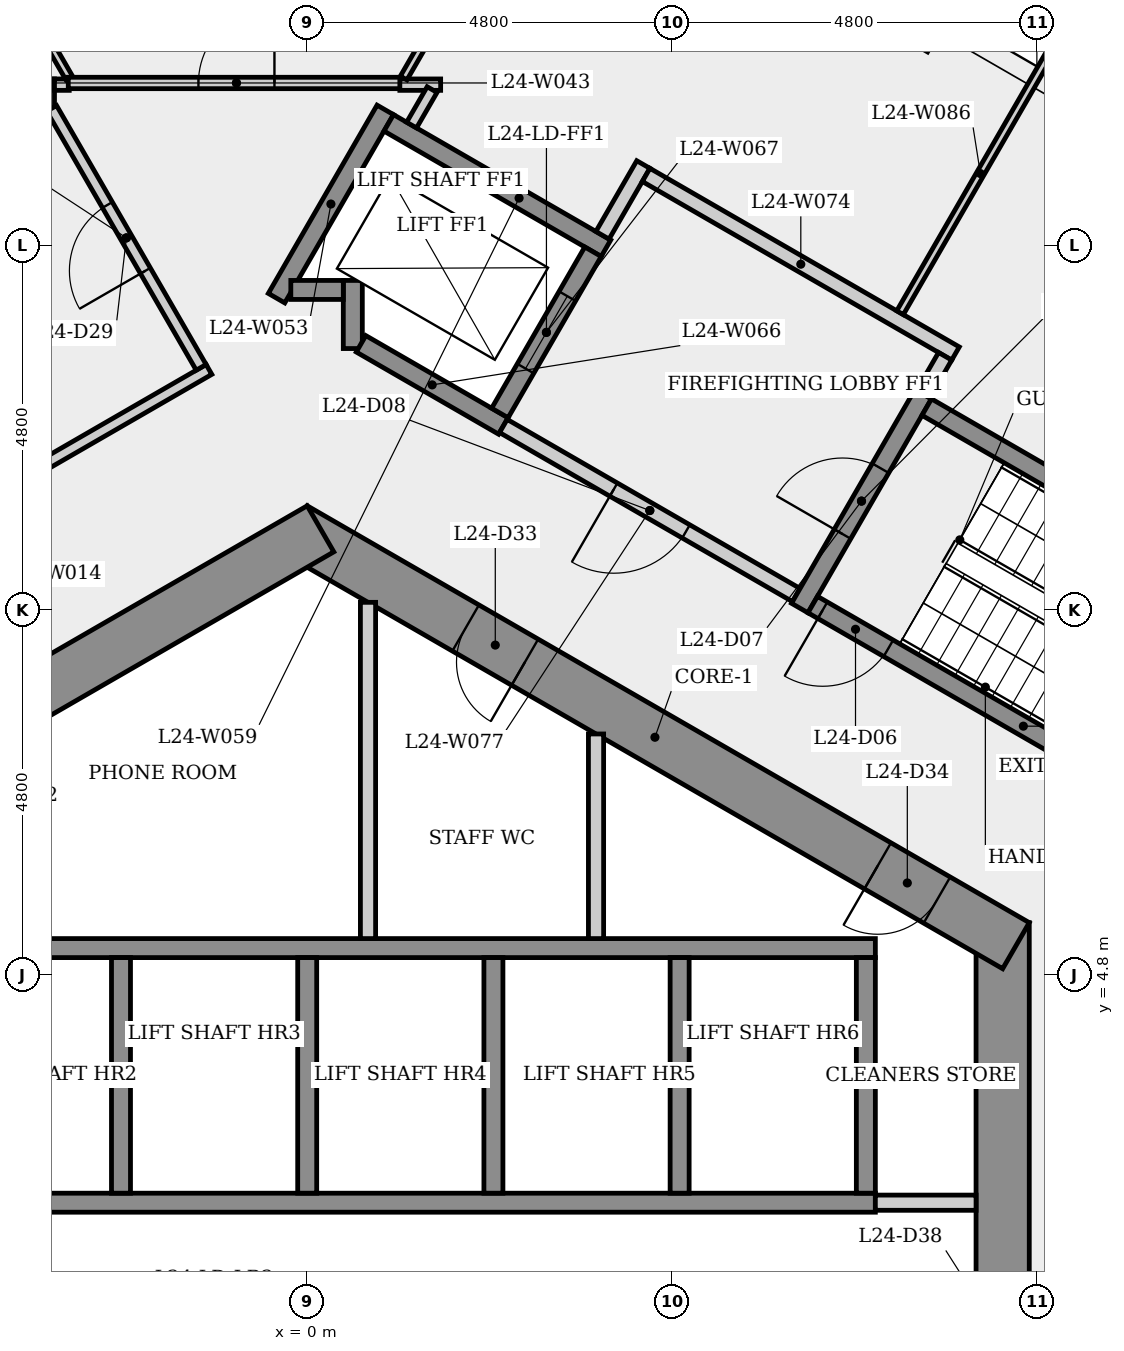
"""IFC4 building model, lengths in metres.
Left out: names, types, materials, properties, quantities, classifications, styles, units other than length and angle.
Written with IfcOpenShell. Run it as: python <this file> out.ifc"""

import sys

from ifc_helpers import new_model, si_unit, direction, frame, frame_2d, origin, place, context, subcontext, project, spatial, rectangle, extrude, element, fill, save


model = new_model("IFC4")
c1 = context("Model", 3, precision=1e-05, world=origin(), true_north=direction((0.0, 1.0)))
c2 = subcontext(c1, "Body", "Model", "MODEL_VIEW")
j1 = project(units=[si_unit("LENGTHUNIT", "METRE"), si_unit("PLANEANGLEUNIT", "RADIAN")], contexts=[c1])
p1 = place(None, origin())
s1 = spatial("IfcSite", under=j1, at=p1, CompositionType="ELEMENT")
p2 = place(p1, origin())
s2 = spatial("IfcBuilding", under=s1, at=p2, CompositionType="ELEMENT")
p3 = place(p2, frame((0.0, 0.0, 93.3)))
s3 = spatial("IfcBuildingStorey", under=s2, at=p3, CompositionType="ELEMENT", Elevation=93.3)
p4 = place(p3, frame((9.15, -5.485, 0.0), z_axis=(0.0, 0.0, 1.0), x_axis=(0.0, 1.0, 0.0)))
e1 = element("IfcWall", 1, at=p4, inside=s3, PredefinedType="SHEAR", context=c2, shape_type="SweptSolid", body=[
    extrude(rectangle(XDim=10.97, YDim=0.7, at=frame_2d((5.485, 0.0))), origin(), (0.0, 0.0, 1.0), 3.4),
])
p5 = place(p4, frame((4.685, 0.0, 0.0)))
e2 = element("IfcOpeningElement", 2, at=p5, cuts=e1, PredefinedType="OPENING", context=c2, shape_type="SweptSolid", body=[
    extrude(rectangle(XDim=1.6, YDim=2.1, at=frame_2d((0.8, 1.05))), frame((0.0, 0.36, 0.0), z_axis=(0.0, -1.0, 0.0), x_axis=(1.0, 0.0, 0.0)), (0.0, 0.0, 1.0), 0.72),
])
p6 = place(p3, frame((9.325, 5.182, 0.0), z_axis=(0.0, 0.0, 1.0), x_axis=(-0.866023993627, 0.500002442456, 0.0)))
e3 = element("IfcWall", 3, at=p6, inside=s3, PredefinedType="SHEAR", context=c2, shape_type="SweptSolid", body=[
    extrude(rectangle(XDim=10.97, YDim=0.7, at=frame_2d((5.485, 0.0))), origin(), (0.0, 0.0, 1.0), 3.4),
])
p7 = place(p6, frame((7.46, 0.0, 0.0)))
e4 = element("IfcOpeningElement", 4, at=p7, cuts=e3, PredefinedType="OPENING", context=c2, shape_type="SweptSolid", body=[
    extrude(rectangle(XDim=0.9, YDim=2.1, at=frame_2d((0.45, 1.05))), frame((0.0, 0.36, 0.0), z_axis=(0.0, -1.0, 0.0), x_axis=(1.0, 0.0, 0.0)), (0.0, 0.0, 1.0), 0.72),
])
p8 = place(p6, frame((1.201, 0.0, 0.0)))
e5 = element("IfcOpeningElement", 5, at=p8, cuts=e3, PredefinedType="OPENING", context=c2, shape_type="SweptSolid", body=[
    extrude(rectangle(XDim=0.9, YDim=2.1, at=frame_2d((0.45, 1.05))), frame((0.0, 0.36, 0.0), z_axis=(0.0, -1.0, 0.0), x_axis=(1.0, 0.0, 0.0)), (0.0, 0.0, 1.0), 0.72),
])
p9 = place(p3, frame((0.175, 10.667, 0.0), z_axis=(0.0, 0.0, 1.0), x_axis=(-0.866023993627, -0.500002442456, 0.0)))
e6 = element("IfcWall", 6, at=p9, inside=s3, PredefinedType="SHEAR", context=c2, shape_type="SweptSolid", body=[
    extrude(rectangle(XDim=10.97, YDim=0.7, at=frame_2d((5.485, 0.0))), origin(), (0.0, 0.0, 1.0), 3.4),
])
p10 = place(p9, frame((6.214, 0.0, 0.0)))
e7 = element("IfcOpeningElement", 7, at=p10, cuts=e6, PredefinedType="OPENING", context=c2, shape_type="SweptSolid", body=[
    extrude(rectangle(XDim=0.9, YDim=2.1, at=frame_2d((0.45, 1.05))), frame((0.0, 0.36, 0.0), z_axis=(0.0, -1.0, 0.0), x_axis=(1.0, 0.0, 0.0)), (0.0, 0.0, 1.0), 0.72),
])
p11 = place(p3, frame((-10.624, 7.376, 0.0), z_axis=(0.0, 0.0, 1.0), x_axis=(0.86602446816, 0.500001620546, 0.0)))
e8 = element("IfcWall", 8, at=p11, inside=s3, PredefinedType="PARTITIONING", context=c2, shape_type="SweptSolid", body=[
    extrude(rectangle(XDim=10.775, YDim=0.15, at=frame_2d((5.387, 0.0))), origin(), (0.0, 0.0, 1.0), 3.05),
])
p12 = place(p11, frame((5.31, 0.0, 0.0)))
e9 = element("IfcOpeningElement", 9, at=p12, cuts=e8, PredefinedType="OPENING", context=c2, shape_type="SweptSolid", body=[
    extrude(rectangle(XDim=1.0, YDim=2.1, at=frame_2d((0.5, 1.05))), frame((0.0, 0.085, 0.0), z_axis=(0.0, -1.0, 0.0), x_axis=(1.0, 0.0, 0.0)), (0.0, 0.0, 1.0), 0.17),
])
p13 = place(p3, frame((-7.475, 1.8, 0.0), z_axis=(0.0, 0.0, 1.0), x_axis=(1.0, 0.0, 0.0)))
e10 = element("IfcWall", 10, at=p13, inside=s3, PredefinedType="SHEAR", context=c2, shape_type="SweptSolid", body=[
    extrude(rectangle(XDim=14.95, YDim=0.25, at=frame_2d((7.475, 0.0))), origin(), (0.0, 0.0, 1.0), 3.05),
])
p14 = place(p3, frame((-7.225, 5.15, 0.0), z_axis=(0.0, 0.0, 1.0), x_axis=(1.0, 0.0, 0.0)))
e11 = element("IfcWall", 11, at=p14, inside=s3, PredefinedType="SHEAR", context=c2, shape_type="SweptSolid", body=[
    extrude(rectangle(XDim=14.7, YDim=0.25, at=frame_2d((7.35, 0.0))), origin(), (0.0, 0.0, 1.0), 3.05),
])
p15 = place(p3, frame((-3.4, 16.189, 0.0), z_axis=(0.0, 0.0, 1.0), x_axis=(0.0, 1.0, 0.0)))
e12 = element("IfcWall", 12, at=p15, inside=s3, PredefinedType="PARTITIONING", context=c2, shape_type="SweptSolid", body=[
    extrude(rectangle(XDim=0.397, YDim=0.15, at=frame_2d((0.199, 0.0))), origin(), (0.0, 0.0, 1.0), 3.05),
])
p16 = place(p3, frame((-3.325, 16.511, 0.0), z_axis=(0.0, 0.0, 1.0), x_axis=(1.0, 0.0, 0.0)))
e13 = element("IfcWall", 13, at=p16, inside=s3, PredefinedType="PARTITIONING", context=c2, shape_type="SweptSolid", body=[
    extrude(rectangle(XDim=0.194, YDim=0.15, at=frame_2d((0.097, 0.0))), origin(), (0.0, 0.0, 1.0), 3.05),
])
p17 = place(p3, frame((-3.131, 16.598, 0.0), z_axis=(0.0, 0.0, 1.0), x_axis=(-0.499982733475, 0.866035372388, 0.0)))
e14 = element("IfcWall", 14, at=p17, inside=s3, PredefinedType="PARTITIONING", context=c2, shape_type="SweptSolid", body=[
    extrude(rectangle(XDim=3.546, YDim=0.1, at=frame_2d((1.773, 0.0))), origin(), (0.0, 0.0, 1.0), 3.05),
])
p18 = place(p3, frame((-3.144, 16.533, 0.0), z_axis=(0.0, 0.0, 1.0), x_axis=(1.0, 0.0, 0.0)))
e15 = element("IfcWall", 15, at=p18, inside=s3, PredefinedType="PARTITIONING", context=c2, shape_type="SweptSolid", body=[
    extrude(rectangle(XDim=4.425, YDim=0.15, at=frame_2d((2.212, 0.0))), origin(), (0.0, 0.0, 1.0), 3.05),
])
p19 = place(p18, frame((1.713, 0.0, 0.0)))
e16 = element("IfcOpeningElement", 16, at=p19, cuts=e15, PredefinedType="OPENING", context=c2, shape_type="SweptSolid", body=[
    extrude(rectangle(XDim=1.0, YDim=2.1, at=frame_2d((0.5, 1.05))), frame((0.0, 0.085, 0.0), z_axis=(0.0, -1.0, 0.0), x_axis=(1.0, 0.0, 0.0)), (0.0, 0.0, 1.0), 0.17),
])
p20 = place(p3, frame((-2.45, 5.025, 0.0), z_axis=(0.0, 0.0, 1.0), x_axis=(0.0, -1.0, 0.0)))
e17 = element("IfcWall", 17, at=p20, inside=s3, PredefinedType="SHEAR", context=c2, shape_type="SweptSolid", body=[
    extrude(rectangle(XDim=3.1, YDim=0.25, at=frame_2d((1.55, 0.0))), origin(), (0.0, 0.0, 1.0), 3.4),
])
p21 = place(p3, frame((-1.395, 12.791, 0.0), z_axis=(0.0, 0.0, 1.0), x_axis=(-0.500016051241, 0.866016136398, 0.0)))
e18 = element("IfcWall", 18, at=p21, inside=s3, PredefinedType="PARTITIONING", context=c2, shape_type="SweptSolid", body=[
    extrude(rectangle(XDim=3.935, YDim=0.15, at=frame_2d((1.967, 0.0))), origin(), (0.0, 0.0, 1.0), 3.05),
])
p22 = place(p21, frame((1.467, 0.0, 0.0)))
e19 = element("IfcOpeningElement", 19, at=p22, cuts=e18, PredefinedType="OPENING", context=c2, shape_type="SweptSolid", body=[
    extrude(rectangle(XDim=1.0, YDim=2.1, at=frame_2d((0.5, 1.05))), frame((0.0, 0.085, 0.0), z_axis=(0.0, -1.0, 0.0), x_axis=(1.0, 0.0, 0.0)), (0.0, 0.0, 1.0), 0.17),
])
p23 = place(p3, frame((-0.403, 13.702, 0.0), z_axis=(0.0, 0.0, 1.0), x_axis=(0.499976111731, 0.866039195244, 0.0)))
e20 = element("IfcWall", 20, at=p23, inside=s3, PredefinedType="SHEAR", context=c2, shape_type="SweptSolid", body=[
    extrude(rectangle(XDim=2.861, YDim=0.25, at=frame_2d((1.43, 0.0))), origin(), (0.0, 0.0, 1.0), 3.05),
])
p24 = place(p3, frame((0.0, 5.025, 0.0), z_axis=(0.0, 0.0, 1.0), x_axis=(0.0, -1.0, 0.0)))
e21 = element("IfcWall", 21, at=p24, inside=s3, PredefinedType="SHEAR", context=c2, shape_type="SweptSolid", body=[
    extrude(rectangle(XDim=3.1, YDim=0.25, at=frame_2d((1.55, 0.0))), origin(), (0.0, 0.0, 1.0), 3.4),
])
p25 = place(p3, frame((0.6, 13.039, 0.0), z_axis=(0.0, 0.0, 1.0), x_axis=(0.0, 1.0, 0.0)))
e22 = element("IfcWall", 22, at=p25, inside=s3, PredefinedType="SHEAR", context=c2, shape_type="SweptSolid", body=[
    extrude(rectangle(XDim=0.896, YDim=0.25, at=frame_2d((0.448, 0.0))), origin(), (0.0, 0.0, 1.0), 3.05),
])
p26 = place(p3, frame((0.475, 13.81, 0.0), z_axis=(0.0, 0.0, 1.0), x_axis=(-1.0, 0.0, 0.0)))
e23 = element("IfcWall", 23, at=p26, inside=s3, PredefinedType="SHEAR", context=c2, shape_type="SweptSolid", body=[
    extrude(rectangle(XDim=0.691, YDim=0.25, at=frame_2d((0.345, 0.0))), origin(), (0.0, 0.0, 1.0), 3.4),
])
p27 = place(p3, frame((0.8, 9.699, 0.0), z_axis=(0.0, 0.0, 1.0), x_axis=(0.0, -1.0, 0.0)))
e24 = element("IfcWall", 24, at=p27, inside=s3, PredefinedType="PARTITIONING", context=c2, shape_type="SweptSolid", body=[
    extrude(rectangle(XDim=4.425, YDim=0.2, at=frame_2d((2.212, 0.0))), origin(), (0.0, 0.0, 1.0), 3.05),
])
p28 = place(p3, frame((1.073, 16.008, 0.0), z_axis=(0.0, 0.0, 1.0), x_axis=(0.866040211805, -0.499974350878, 0.0)))
e25 = element("IfcWall", 25, at=p28, inside=s3, PredefinedType="SHEAR", context=c2, shape_type="SweptSolid", body=[
    extrude(rectangle(XDim=3.3, YDim=0.25, at=frame_2d((1.65, 0.0))), origin(), (0.0, 0.0, 1.0), 3.05),
])
p29 = place(p3, frame((1.219, 16.511, 0.0), z_axis=(0.0, 0.0, 1.0), x_axis=(1.0, 0.0, 0.0)))
e26 = element("IfcWall", 26, at=p29, inside=s3, PredefinedType="PARTITIONING", context=c2, shape_type="SweptSolid", body=[
    extrude(rectangle(XDim=0.537, YDim=0.15, at=frame_2d((0.269, 0.0))), origin(), (0.0, 0.0, 1.0), 3.05),
])
p30 = place(p3, frame((1.643, 16.446, 0.0), z_axis=(0.0, 0.0, 1.0), x_axis=(-0.500179556555, -0.865921711937, 0.0)))
e27 = element("IfcWall", 27, at=p30, inside=s3, PredefinedType="PARTITIONING", context=c2, shape_type="SweptSolid", body=[
    extrude(rectangle(XDim=0.539, YDim=0.15, at=frame_2d((0.27, 0.0))), origin(), (0.0, 0.0, 1.0), 3.05),
])
p31 = place(p3, frame((2.45, 5.025, 0.0), z_axis=(0.0, 0.0, 1.0), x_axis=(0.0, -1.0, 0.0)))
e28 = element("IfcWall", 28, at=p31, inside=s3, PredefinedType="SHEAR", context=c2, shape_type="SweptSolid", body=[
    extrude(rectangle(XDim=3.1, YDim=0.25, at=frame_2d((1.55, 0.0))), origin(), (0.0, 0.0, 1.0), 3.4),
])
p32 = place(p3, frame((2.581, 12.02, 0.0), z_axis=(0.0, 0.0, 1.0), x_axis=(-0.86603892542, 0.499976579108, 0.0)))
e29 = element("IfcWall", 29, at=p32, inside=s3, PredefinedType="SHEAR", context=c2, shape_type="SweptSolid", body=[
    extrude(rectangle(XDim=2.162, YDim=0.25, at=frame_2d((1.081, 0.0))), origin(), (0.0, 0.0, 1.0), 3.05),
])
p33 = place(p3, frame((2.535, 12.191, 0.0), z_axis=(0.0, 0.0, 1.0), x_axis=(0.500061746146, 0.865989751695, 0.0)))
e30 = element("IfcWall", 30, at=p33, inside=s3, PredefinedType="SHEAR", context=c2, shape_type="SweptSolid", body=[
    extrude(rectangle(XDim=2.45, YDim=0.25, at=frame_2d((1.225, 0.0))), origin(), (0.0, 0.0, 1.0), 3.4),
])
p34 = place(p33, frame((0.675, 0.0, 0.0)))
e31 = element("IfcOpeningElement", 31, at=p34, cuts=e30, PredefinedType="OPENING", context=c2, shape_type="SweptSolid", body=[
    extrude(rectangle(XDim=1.1, YDim=2.1, at=frame_2d((0.55, 1.05))), frame((0.0, 0.135, 0.0), z_axis=(0.0, -1.0, 0.0), x_axis=(1.0, 0.0, 0.0)), (0.0, 0.0, 1.0), 0.27),
])
p35 = place(p3, frame((3.679, 20.772, 0.0), z_axis=(0.0, 0.0, 1.0), x_axis=(-0.500023547092, -0.866011808438, 0.0)))
e32 = element("IfcWall", 32, at=p35, inside=s3, PredefinedType="PARTITIONING", context=c2, shape_type="SweptSolid", body=[
    extrude(rectangle(XDim=4.82, YDim=0.1, at=frame_2d((2.41, 0.0))), origin(), (0.0, 0.0, 1.0), 3.05),
])
p36 = place(p35, frame((2.22, 0.0, 0.0)))
e33 = element("IfcOpeningElement", 33, at=p36, cuts=e32, PredefinedType="OPENING", context=c2, shape_type="SweptSolid", body=[
    extrude(rectangle(XDim=0.9, YDim=2.1, at=frame_2d((0.45, 1.05))), frame((0.0, 0.06, 0.0), z_axis=(0.0, -1.0, 0.0), x_axis=(1.0, 0.0, 0.0)), (0.0, 0.0, 1.0), 0.12),
])
p37 = place(p3, frame((3.8, 7.967, 0.0), z_axis=(0.0, 0.0, 1.0), x_axis=(0.0, -1.0, 0.0)))
e34 = element("IfcWall", 34, at=p37, inside=s3, PredefinedType="PARTITIONING", context=c2, shape_type="SweptSolid", body=[
    extrude(rectangle(XDim=2.692, YDim=0.2, at=frame_2d((1.346, 0.0))), origin(), (0.0, 0.0, 1.0), 3.05),
])
p38 = place(p3, frame((3.885, 14.529, 0.0), z_axis=(0.0, 0.0, 1.0), x_axis=(0.499997628298, 0.866026773083, 0.0)))
e35 = element("IfcWall", 35, at=p38, inside=s3, PredefinedType="PARTITIONING", context=c2, shape_type="SweptSolid", body=[
    extrude(rectangle(XDim=1.075, YDim=0.2, at=frame_2d((0.538, 0.0))), origin(), (0.0, 0.0, 1.0), 3.05),
])
p39 = place(p3, frame((4.459, 15.323, 0.0), z_axis=(0.0, 0.0, 1.0), x_axis=(0.866016039709, -0.500016218704, 0.0)))
e36 = element("IfcWall", 36, at=p39, inside=s3, PredefinedType="PARTITIONING", context=c2, shape_type="SweptSolid", body=[
    extrude(rectangle(XDim=4.7, YDim=0.2, at=frame_2d((2.35, 0.0))), origin(), (0.0, 0.0, 1.0), 3.05),
])
p40 = place(p3, frame((4.9, 5.025, 0.0), z_axis=(0.0, 0.0, 1.0), x_axis=(0.0, -1.0, 0.0)))
e37 = element("IfcWall", 37, at=p40, inside=s3, PredefinedType="SHEAR", context=c2, shape_type="SweptSolid", body=[
    extrude(rectangle(XDim=3.1, YDim=0.25, at=frame_2d((1.55, 0.0))), origin(), (0.0, 0.0, 1.0), 3.4),
])
p41 = place(p3, frame((6.435, 9.795, 0.0), z_axis=(0.0, 0.0, 1.0), x_axis=(-0.866012907634, 0.500021643343, 0.0)))
e38 = element("IfcWall", 38, at=p41, inside=s3, PredefinedType="PARTITIONING", context=c2, shape_type="SweptSolid", body=[
    extrude(rectangle(XDim=4.45, YDim=0.2, at=frame_2d((2.225, 0.0))), origin(), (0.0, 0.0, 1.0), 3.05),
])
p42 = place(p41, frame((1.675, 0.0, 0.0)))
e39 = element("IfcOpeningElement", 39, at=p42, cuts=e38, PredefinedType="OPENING", context=c2, shape_type="SweptSolid", body=[
    extrude(rectangle(XDim=1.1, YDim=2.1, at=frame_2d((0.55, 1.05))), frame((0.0, 0.11, 0.0), z_axis=(0.0, -1.0, 0.0), x_axis=(1.0, 0.0, 0.0)), (0.0, 0.0, 1.0), 0.22),
])
p43 = place(p3, frame((6.48, 9.624, 0.0), z_axis=(0.0, 0.0, 1.0), x_axis=(0.500017246033, 0.866015446554, 0.0)))
e40 = element("IfcWall", 40, at=p43, inside=s3, PredefinedType="SHEAR", context=c2, shape_type="SweptSolid", body=[
    extrude(rectangle(XDim=3.25, YDim=0.25, at=frame_2d((1.625, 0.0))), origin(), (0.0, 0.0, 1.0), 3.05),
])
p44 = place(p43, frame((1.125, 0.0, 0.0)))
e41 = element("IfcOpeningElement", 41, at=p44, cuts=e40, PredefinedType="OPENING", context=c2, shape_type="SweptSolid", body=[
    extrude(rectangle(XDim=1.0, YDim=2.1, at=frame_2d((0.5, 1.05))), frame((0.0, 0.135, 0.0), z_axis=(0.0, -1.0, 0.0), x_axis=(1.0, 0.0, 0.0)), (0.0, 0.0, 1.0), 0.27),
])
p45 = place(p3, frame((7.475, 1.8, 0.0), z_axis=(0.0, 0.0, 1.0), x_axis=(1.0, 0.0, 0.0)))
e42 = element("IfcWall", 42, at=p45, inside=s3, PredefinedType="PARTITIONING", context=c2, shape_type="SweptSolid", body=[
    extrude(rectangle(XDim=1.325, YDim=0.2, at=frame_2d((0.663, 0.0))), origin(), (0.0, 0.0, 1.0), 3.05),
])
p46 = place(p3, frame((7.35, 5.025, 0.0), z_axis=(0.0, 0.0, 1.0), x_axis=(0.0, -1.0, 0.0)))
e43 = element("IfcWall", 43, at=p46, inside=s3, PredefinedType="SHEAR", context=c2, shape_type="SweptSolid", body=[
    extrude(rectangle(XDim=3.1, YDim=0.25, at=frame_2d((1.55, 0.0))), origin(), (0.0, 0.0, 1.0), 3.4),
])
p47 = place(p3, frame((7.8, 13.51, 0.0), z_axis=(0.0, 0.0, 1.0), x_axis=(0.499988999718, 0.866031754707, 0.0)))
e44 = element("IfcWall", 44, at=p47, inside=s3, PredefinedType="PARTITIONING", context=c2, shape_type="SweptSolid", body=[
    extrude(rectangle(XDim=4.229, YDim=0.1, at=frame_2d((2.114, 0.0))), origin(), (0.0, 0.0, 1.0), 3.05),
])
p48 = place(p3, frame((8.151, 12.268, 0.0), z_axis=(0.0, 0.0, 1.0), x_axis=(0.866025499775, -0.499999833739, 0.0)))
e45 = element("IfcWall", 45, at=p48, inside=s3, PredefinedType="SHEAR", context=c2, shape_type="SweptSolid", body=[
    extrude(rectangle(XDim=6.4, YDim=0.25, at=frame_2d((3.2, 0.0))), origin(), (0.0, 0.0, 1.0), 3.05),
])
p49 = place(p3, frame((8.393, 12.937, 0.0), z_axis=(0.0, 0.0, 1.0), x_axis=(-0.500065409566, -0.86598763626, 0.0)))
e46 = element("IfcWall", 46, at=p49, inside=s3, PredefinedType="PARTITIONING", context=c2, shape_type="SweptSolid", body=[
    extrude(rectangle(XDim=0.575, YDim=0.2, at=frame_2d((0.288, 0.0))), origin(), (0.0, 0.0, 1.0), 3.05),
])
p50 = place(p3, frame((12.194, 6.47, 0.0), z_axis=(0.0, 0.0, 1.0), x_axis=(-0.866025499775, 0.499999833739, 0.0)))
e47 = element("IfcWall", 47, at=p50, inside=s3, PredefinedType="SHEAR", context=c2, shape_type="SweptSolid", body=[
    extrude(rectangle(XDim=6.4, YDim=0.25, at=frame_2d((3.2, 0.0))), origin(), (0.0, 0.0, 1.0), 3.05),
])
p51 = place(p50, frame((5.25, 0.0, 0.0)))
e48 = element("IfcOpeningElement", 48, at=p51, cuts=e47, PredefinedType="OPENING", context=c2, shape_type="SweptSolid", body=[
    extrude(rectangle(XDim=1.0, YDim=2.1, at=frame_2d((0.5, 1.05))), frame((0.0, 0.135, 0.0), z_axis=(0.0, -1.0, 0.0), x_axis=(1.0, 0.0, 0.0)), (0.0, 0.0, 1.0), 0.27),
])
p52 = place(p51, origin())
e49 = element("IfcDoor", 49, at=p52, inside=s3, OperationType="SINGLE_SWING_RIGHT", PredefinedType="DOOR", context=c2, shape_type="SweptSolid", body=[
    extrude(rectangle(XDim=1.0, YDim=2.1, at=frame_2d((0.5, 1.05))), frame((0.0, 0.025, 0.0), z_axis=(0.0, -1.0, 0.0), x_axis=(1.0, 0.0, 0.0)), (0.0, 0.0, 1.0), 0.05),
])
fill(e48, e49)
p53 = place(p44, origin())
e50 = element("IfcDoor", 50, at=p53, inside=s3, OperationType="SINGLE_SWING_LEFT", PredefinedType="DOOR", context=c2, shape_type="SweptSolid", body=[
    extrude(rectangle(XDim=1.0, YDim=2.1, at=frame_2d((0.5, 1.05))), frame((0.0, 0.025, 0.0), z_axis=(0.0, -1.0, 0.0), x_axis=(1.0, 0.0, 0.0)), (0.0, 0.0, 1.0), 0.05),
])
fill(e41, e50)
p54 = place(p42, origin())
e51 = element("IfcDoor", 51, at=p54, inside=s3, OperationType="SINGLE_SWING_RIGHT", PredefinedType="DOOR", context=c2, shape_type="SweptSolid", body=[
    extrude(rectangle(XDim=1.1, YDim=2.1, at=frame_2d((0.55, 1.05))), frame((0.0, 0.025, 0.0), z_axis=(0.0, -1.0, 0.0), x_axis=(1.0, 0.0, 0.0)), (0.0, 0.0, 1.0), 0.05),
])
fill(e39, e51)
p55 = place(p34, origin())
e52 = element("IfcDoor", 52, at=p55, inside=s3, OperationType="SLIDING_TO_LEFT", PredefinedType="DOOR", context=c2, shape_type="SweptSolid", body=[
    extrude(rectangle(XDim=1.1, YDim=2.1, at=frame_2d((0.55, 1.05))), frame((0.0, 0.025, 0.0), z_axis=(0.0, -1.0, 0.0), x_axis=(1.0, 0.0, 0.0)), (0.0, 0.0, 1.0), 0.05),
])
fill(e31, e52)
p56 = place(p19, origin())
e53 = element("IfcDoor", 53, at=p56, inside=s3, OperationType="SINGLE_SWING_RIGHT", PredefinedType="DOOR", context=c2, shape_type="SweptSolid", body=[
    extrude(rectangle(XDim=1.0, YDim=2.1, at=frame_2d((0.5, 1.05))), frame((0.0, 0.025, 0.0), z_axis=(0.0, -1.0, 0.0), x_axis=(1.0, 0.0, 0.0)), (0.0, 0.0, 1.0), 0.05),
])
fill(e16, e53)
p57 = place(p22, origin())
e54 = element("IfcDoor", 54, at=p57, inside=s3, OperationType="SINGLE_SWING_LEFT", PredefinedType="DOOR", context=c2, shape_type="SweptSolid", body=[
    extrude(rectangle(XDim=1.0, YDim=2.1, at=frame_2d((0.5, 1.05))), frame((0.0, 0.025, 0.0), z_axis=(0.0, -1.0, 0.0), x_axis=(1.0, 0.0, 0.0)), (0.0, 0.0, 1.0), 0.05),
])
fill(e19, e54)
p58 = place(p7, origin())
e55 = element("IfcDoor", 55, at=p58, inside=s3, OperationType="SINGLE_SWING_LEFT", PredefinedType="DOOR", context=c2, shape_type="SweptSolid", body=[
    extrude(rectangle(XDim=0.9, YDim=2.1, at=frame_2d((0.45, 1.05))), frame((0.0, 0.025, 0.0), z_axis=(0.0, -1.0, 0.0), x_axis=(1.0, 0.0, 0.0)), (0.0, 0.0, 1.0), 0.05),
])
fill(e4, e55)
p59 = place(p8, origin())
e56 = element("IfcDoor", 56, at=p59, inside=s3, OperationType="SINGLE_SWING_RIGHT", PredefinedType="DOOR", context=c2, shape_type="SweptSolid", body=[
    extrude(rectangle(XDim=0.9, YDim=2.1, at=frame_2d((0.45, 1.05))), frame((0.0, 0.025, 0.0), z_axis=(0.0, -1.0, 0.0), x_axis=(1.0, 0.0, 0.0)), (0.0, 0.0, 1.0), 0.05),
])
fill(e5, e56)
save(model, sys.argv[1])
